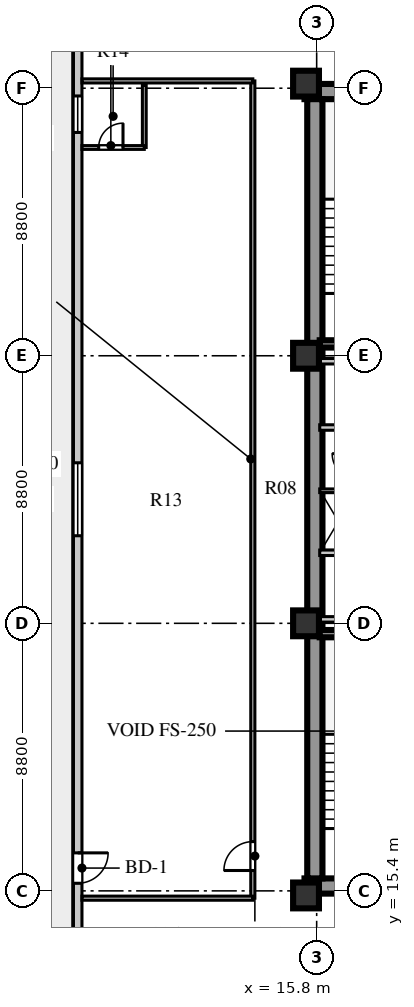
"""IFC4 building model, lengths in metres.
Left out: names, types, materials, properties, quantities, classifications, styles, units other than length and angle.
Written with IfcOpenShell. Run it as: python <this file> out.ifc"""

import sys

from ifc_helpers import new_model, si_unit, direction, frame, frame_2d, origin, origin_2d, place, context, subcontext, project, spatial, rectangle, extrude, element, fill, save


model = new_model("IFC4")
c1 = context("Model", 3, precision=1e-05, world=origin(), true_north=direction((0.0, 1.0)))
c2 = subcontext(c1, "Body", "Model", "MODEL_VIEW")
j1 = project(units=[si_unit("LENGTHUNIT", "METRE"), si_unit("PLANEANGLEUNIT", "RADIAN")], contexts=[c1])
p1 = place(None, origin())
s1 = spatial("IfcSite", under=j1, at=p1, CompositionType="ELEMENT")
p2 = place(p1, origin())
s2 = spatial("IfcBuilding", under=s1, at=p2, CompositionType="ELEMENT")
p3 = place(p2, frame((0.0, 0.0, 188.7)))
s3 = spatial("IfcBuildingStorey", under=s2, at=p3, CompositionType="ELEMENT", Elevation=188.7)
for number, where, z_axis, x_axis in (
    (1, (15.4, 15.56, 0.0), (0.0, 0.0, 1.0), (1.0, 0.0, 0.0)),
    (2, (15.4, 41.69, 0.0), (0.0, 0.0, 1.0), (1.0, 0.0, 0.0)),
):
    element("IfcWall", number, at=place(p3, frame(where, z_axis=z_axis, x_axis=x_axis)), inside=s3, PredefinedType="SHEAR", context=c2, shape_type="SweptSolid", body=[
        extrude(rectangle(XDim=9.68, YDim=0.5, at=frame_2d((4.84, 0.0))), origin(), (0.0, 0.0, 1.0), 3.6),
    ])
p4 = place(p3, frame((15.74, 15.81, 0.0), z_axis=(0.0, 0.0, 1.0), x_axis=(0.0, 1.0, 0.0)))
e3 = element("IfcWall", 3, at=p4, inside=s3, PredefinedType="SHEAR", context=c2, shape_type="SweptSolid", body=[
    extrude(rectangle(XDim=25.63, YDim=0.5, at=frame_2d((12.815, 0.0))), origin(), (0.0, 0.0, 1.0), 3.6),
])
for number, where, z_axis, x_axis in (
    (4, (15.45, 15.25, 0.0), (0.0, 0.0, 1.0), (1.0, 0.0, 0.0)),
    (5, (15.45, 24.2, 0.0), (0.0, 0.0, 1.0), (1.0, 0.0, 0.0)),
    (6, (15.45, 33.0, 0.0), (0.0, 0.0, 1.0), (1.0, 0.0, 0.0)),
    (7, (15.45, 41.95, 0.0), (0.0, 0.0, 1.0), (1.0, 0.0, 0.0)),
):
    element("IfcColumn", number, at=place(p3, frame(where, z_axis=z_axis, x_axis=x_axis)), inside=s3, PredefinedType="COLUMN", context=c2, shape_type="SweptSolid", body=[
        extrude(rectangle(XDim=0.85, YDim=0.85, at=origin_2d()), origin(), (0.0, 0.0, 1.0), 3.6),
    ])
p5 = place(p3, frame((7.94, 44.07, 0.0), z_axis=(0.0, 0.0, 1.0), x_axis=(0.0, -1.0, 0.0)))
e8 = element("IfcWall", 8, at=p5, inside=s3, PredefinedType="STANDARD", context=c2, shape_type="SweptSolid", body=[
    extrude(rectangle(XDim=30.94, YDim=0.28, at=frame_2d((15.47, 0.0))), origin(), (0.0, 0.0, 1.0), 3.6),
])
p6 = place(p5, frame((27.42, 0.0, 0.0)))
e9 = element("IfcOpeningElement", 9, at=p6, cuts=e8, PredefinedType="OPENING", context=c2, shape_type="SweptSolid", body=[
    extrude(rectangle(XDim=1.0, YDim=2.05, at=frame_2d((0.5, 1.025))), frame((0.0, 0.15, 0.0), z_axis=(0.0, -1.0, 0.0), x_axis=(1.0, 0.0, 0.0)), (0.0, 0.0, 1.0), 0.3),
])
p7 = place(p5, frame((14.59, 0.0, 0.8)))
e10 = element("IfcOpeningElement", 10, at=p7, cuts=e8, PredefinedType="OPENING", context=c2, shape_type="SweptSolid", body=[
    extrude(rectangle(XDim=2.4, YDim=2.05, at=frame_2d((1.2, 1.025))), frame((0.0, 0.15, 0.0), z_axis=(0.0, -1.0, 0.0), x_axis=(1.0, 0.0, 0.0)), (0.0, 0.0, 1.0), 0.3),
])
p8 = place(p5, frame((2.525, 0.0, 0.8)))
e11 = element("IfcOpeningElement", 11, at=p8, cuts=e8, PredefinedType="OPENING", context=c2, shape_type="SweptSolid", body=[
    extrude(rectangle(XDim=1.2, YDim=1.75, at=frame_2d((0.6, 0.875))), frame((0.0, 0.15, 0.0), z_axis=(0.0, -1.0, 0.0), x_axis=(1.0, 0.0, 0.0)), (0.0, 0.0, 1.0), 0.3),
])
p9 = place(p3, frame((15.9, 23.86, 0.0), z_axis=(0.0, 0.0, 1.0), x_axis=(1.0, 0.0, 0.0)))
e12 = element("IfcWall", 12, at=p9, inside=s3, PredefinedType="SHEAR", context=c2, shape_type="SweptSolid", body=[
    extrude(rectangle(XDim=3.52, YDim=0.24, at=frame_2d((1.76, 0.0))), origin(), (0.0, 0.0, 1.0), 3.85),
])
p10 = place(p3, frame((15.9, 26.52, 0.0), z_axis=(0.0, 0.0, 1.0), x_axis=(1.0, 0.0, 0.0)))
e13 = element("IfcWall", 13, at=p10, inside=s3, PredefinedType="SOLIDWALL", context=c2, shape_type="SweptSolid", body=[
    extrude(rectangle(XDim=8.68, YDim=0.18, at=frame_2d((4.34, 0.0))), origin(), (0.0, 0.0, 1.0), 3.6),
])
p11 = place(p10, frame((2.5, 0.0, 0.0)))
e14 = element("IfcOpeningElement", 14, at=p11, cuts=e13, PredefinedType="OPENING", context=c2, shape_type="SweptSolid", body=[
    extrude(rectangle(XDim=0.95, YDim=2.1, at=frame_2d((0.475, 1.05))), frame((0.0, 0.1, 0.0), z_axis=(0.0, -1.0, 0.0), x_axis=(1.0, 0.0, 0.0)), (0.0, 0.0, 1.0), 0.2),
])
p12 = place(p10, frame((6.0, 0.0, 0.0)))
e15 = element("IfcOpeningElement", 15, at=p12, cuts=e13, PredefinedType="OPENING", context=c2, shape_type="SweptSolid", body=[
    extrude(rectangle(XDim=0.95, YDim=2.1, at=frame_2d((0.475, 1.05))), frame((0.0, 0.1, 0.0), z_axis=(0.0, -1.0, 0.0), x_axis=(1.0, 0.0, 0.0)), (0.0, 0.0, 1.0), 0.2),
])
p13 = place(p3, frame((15.9, 24.33, 0.0), z_axis=(0.0, 0.0, 1.0), x_axis=(1.0, 0.0, 0.0)))
e16 = element("IfcWall", 16, at=p13, inside=s3, PredefinedType="SOLIDWALL", context=c2, shape_type="SweptSolid", body=[
    extrude(rectangle(XDim=8.68, YDim=0.18, at=frame_2d((4.34, 0.0))), origin(), (0.0, 0.0, 1.0), 2.95),
])
p14 = place(p3, frame((15.9, 28.56, 0.0), z_axis=(0.0, 0.0, 1.0), x_axis=(1.0, 0.0, 0.0)))
e17 = element("IfcWall", 17, at=p14, inside=s3, PredefinedType="PARTITIONING", context=c2, shape_type="SweptSolid", body=[
    extrude(rectangle(XDim=1.2, YDim=0.12, at=frame_2d((0.6, 0.0))), origin(), (0.0, 0.0, 1.0), 3.6),
])
p15 = place(p3, frame((15.9, 30.64, 0.0), z_axis=(0.0, 0.0, 1.0), x_axis=(1.0, 0.0, 0.0)))
e18 = element("IfcWall", 18, at=p15, inside=s3, PredefinedType="SOLIDWALL", context=c2, shape_type="SweptSolid", body=[
    extrude(rectangle(XDim=8.68, YDim=0.18, at=frame_2d((4.34, 0.0))), origin(), (0.0, 0.0, 1.0), 3.6),
])
p16 = place(p15, frame((1.76, 0.0, 0.0)))
e19 = element("IfcOpeningElement", 19, at=p16, cuts=e18, PredefinedType="OPENING", context=c2, shape_type="SweptSolid", body=[
    extrude(rectangle(XDim=1.0, YDim=2.1, at=frame_2d((0.5, 1.05))), frame((0.0, 0.1, 0.0), z_axis=(0.0, -1.0, 0.0), x_axis=(1.0, 0.0, 0.0)), (0.0, 0.0, 1.0), 0.2),
])
p17 = place(p15, frame((3.6, 0.0, 0.0)))
e20 = element("IfcOpeningElement", 20, at=p17, cuts=e18, PredefinedType="OPENING", context=c2, shape_type="SweptSolid", body=[
    extrude(rectangle(XDim=1.0, YDim=2.1, at=frame_2d((0.5, 1.05))), frame((0.0, 0.1, 0.0), z_axis=(0.0, -1.0, 0.0), x_axis=(1.0, 0.0, 0.0)), (0.0, 0.0, 1.0), 0.2),
])
p18 = place(p15, frame((5.44, 0.0, 0.0)))
e21 = element("IfcOpeningElement", 21, at=p18, cuts=e18, PredefinedType="OPENING", context=c2, shape_type="SweptSolid", body=[
    extrude(rectangle(XDim=1.0, YDim=2.1, at=frame_2d((0.5, 1.05))), frame((0.0, 0.1, 0.0), z_axis=(0.0, -1.0, 0.0), x_axis=(1.0, 0.0, 0.0)), (0.0, 0.0, 1.0), 0.2),
])
p19 = place(p15, frame((7.28, 0.0, 0.0)))
e22 = element("IfcOpeningElement", 22, at=p19, cuts=e18, PredefinedType="OPENING", context=c2, shape_type="SweptSolid", body=[
    extrude(rectangle(XDim=1.0, YDim=2.1, at=frame_2d((0.5, 1.05))), frame((0.0, 0.1, 0.0), z_axis=(0.0, -1.0, 0.0), x_axis=(1.0, 0.0, 0.0)), (0.0, 0.0, 1.0), 0.2),
])
p20 = place(p3, frame((15.9, 32.82, 0.0), z_axis=(0.0, 0.0, 1.0), x_axis=(1.0, 0.0, 0.0)))
e23 = element("IfcWall", 23, at=p20, inside=s3, PredefinedType="SOLIDWALL", context=c2, shape_type="SweptSolid", body=[
    extrude(rectangle(XDim=8.68, YDim=0.18, at=frame_2d((4.34, 0.0))), origin(), (0.0, 0.0, 1.0), 2.95),
])
p21 = place(p3, frame((15.9, 33.39, 0.0), z_axis=(0.0, 0.0, 1.0), x_axis=(1.0, 0.0, 0.0)))
e24 = element("IfcWall", 24, at=p21, inside=s3, PredefinedType="SHEAR", context=c2, shape_type="SweptSolid", body=[
    extrude(rectangle(XDim=3.52, YDim=0.24, at=frame_2d((1.76, 0.0))), origin(), (0.0, 0.0, 1.0), 3.85),
])
p22 = place(p3, frame((13.7, 15.16, 0.0), z_axis=(0.0, 0.0, 1.0), x_axis=(0.0, 1.0, 0.0)))
e25 = element("IfcWall", 25, at=p22, inside=s3, PredefinedType="PARTITIONING", context=c2, shape_type="SweptSolid", body=[
    extrude(rectangle(XDim=26.88, YDim=0.135, at=frame_2d((13.44, 0.0))), origin(), (0.0, 0.0, 1.0), 3.6),
])
p23 = place(p22, frame((0.91, 0.0, 0.0)))
e26 = element("IfcOpeningElement", 26, at=p23, cuts=e25, PredefinedType="OPENING", context=c2, shape_type="SweptSolid", body=[
    extrude(rectangle(XDim=0.95, YDim=2.1, at=frame_2d((0.475, 1.05))), frame((0.0, 0.078, 0.0), z_axis=(0.0, -1.0, 0.0), x_axis=(1.0, 0.0, 0.0)), (0.0, 0.0, 1.0), 0.155),
])
for number, where, z_axis, x_axis in (
    (27, (8.08, 15.16, 0.0), (0.0, 0.0, 1.0), (1.0, 0.0, 0.0)),
    (28, (8.08, 42.04, 0.0), (0.0, 0.0, 1.0), (1.0, 0.0, 0.0)),
):
    element("IfcWall", number, at=place(p3, frame(where, z_axis=z_axis, x_axis=x_axis)), inside=s3, PredefinedType="PARTITIONING", context=c2, shape_type="SweptSolid", body=[
        extrude(rectangle(XDim=5.62, YDim=0.135, at=frame_2d((2.81, 0.0))), origin(), (0.0, 0.0, 1.0), 3.15),
    ])
p24 = place(p3, frame((10.13, 39.85, 0.0), z_axis=(0.0, 0.0, 1.0), x_axis=(0.0, 1.0, 0.0)))
e29 = element("IfcWall", 29, at=p24, inside=s3, PredefinedType="PLUMBINGWALL", context=c2, shape_type="SweptSolid", body=[
    extrude(rectangle(XDim=2.05, YDim=0.125, at=frame_2d((1.025, 0.0))), origin(), (0.0, 0.0, 1.0), 3.6),
])
p25 = place(p3, frame((8.08, 39.85, 0.0), z_axis=(0.0, 0.0, 1.0), x_axis=(1.0, 0.0, 0.0)))
e30 = element("IfcWall", 30, at=p25, inside=s3, PredefinedType="PLUMBINGWALL", context=c2, shape_type="SweptSolid", body=[
    extrude(rectangle(XDim=2.05, YDim=0.125, at=frame_2d((1.025, 0.0))), origin(), (0.0, 0.0, 1.0), 3.6),
])
p26 = place(p25, frame((0.55, 0.0, 0.0)))
e31 = element("IfcOpeningElement", 31, at=p26, cuts=e30, PredefinedType="OPENING", context=c2, shape_type="SweptSolid", body=[
    extrude(rectangle(XDim=0.8, YDim=2.05, at=frame_2d((0.4, 1.025))), frame((0.0, 0.073, 0.0), z_axis=(0.0, -1.0, 0.0), x_axis=(1.0, 0.0, 0.0)), (0.0, 0.0, 1.0), 0.145),
])
p27 = place(p6, frame((1.0, 0.0, 0.0), z_axis=(0.0, 0.0, 1.0), x_axis=(-1.0, 0.0, 0.0)))
e32 = element("IfcDoor", 32, at=p27, inside=s3, OperationType="SINGLE_SWING_RIGHT", PredefinedType="DOOR", context=c2, shape_type="SweptSolid", body=[
    extrude(rectangle(XDim=1.0, YDim=2.05, at=frame_2d((0.5, 1.025))), frame((0.0, 0.025, 0.0), z_axis=(0.0, -1.0, 0.0), x_axis=(1.0, 0.0, 0.0)), (0.0, 0.0, 1.0), 0.05),
])
fill(e9, e32)
p28 = place(p7, origin())
e33 = element("IfcWindow", 33, at=p28, inside=s3, PartitioningType="SINGLE_PANEL", PredefinedType="WINDOW", context=c2, shape_type="SweptSolid", body=[
    extrude(rectangle(XDim=2.4, YDim=2.05, at=frame_2d((1.2, 1.025))), frame((0.0, 0.03, 0.0), z_axis=(0.0, -1.0, 0.0), x_axis=(1.0, 0.0, 0.0)), (0.0, 0.0, 1.0), 0.06),
])
fill(e10, e33)
p29 = place(p8, origin())
e34 = element("IfcWindow", 34, at=p29, inside=s3, PartitioningType="SINGLE_PANEL", PredefinedType="WINDOW", context=c2, shape_type="SweptSolid", body=[
    extrude(rectangle(XDim=1.2, YDim=1.75, at=frame_2d((0.6, 0.875))), frame((0.0, 0.03, 0.0), z_axis=(0.0, -1.0, 0.0), x_axis=(1.0, 0.0, 0.0)), (0.0, 0.0, 1.0), 0.06),
])
fill(e11, e34)
p30 = place(p23, origin())
e35 = element("IfcDoor", 35, at=p30, inside=s3, OperationType="SINGLE_SWING_LEFT", PredefinedType="DOOR", context=c2, shape_type="SweptSolid", body=[
    extrude(rectangle(XDim=0.95, YDim=2.1, at=frame_2d((0.475, 1.05))), frame((0.0, 0.025, 0.0), z_axis=(0.0, -1.0, 0.0), x_axis=(1.0, 0.0, 0.0)), (0.0, 0.0, 1.0), 0.05),
])
fill(e26, e35)
p31 = place(p26, frame((0.8, 0.0, 0.0), z_axis=(0.0, 0.0, 1.0), x_axis=(-1.0, 0.0, 0.0)))
e36 = element("IfcDoor", 36, at=p31, inside=s3, OperationType="SINGLE_SWING_LEFT", PredefinedType="DOOR", context=c2, shape_type="SweptSolid", body=[
    extrude(rectangle(XDim=0.8, YDim=2.05, at=frame_2d((0.4, 1.025))), frame((0.0, 0.025, 0.0), z_axis=(0.0, -1.0, 0.0), x_axis=(1.0, 0.0, 0.0)), (0.0, 0.0, 1.0), 0.05),
])
fill(e31, e36)
save(model, sys.argv[1])
